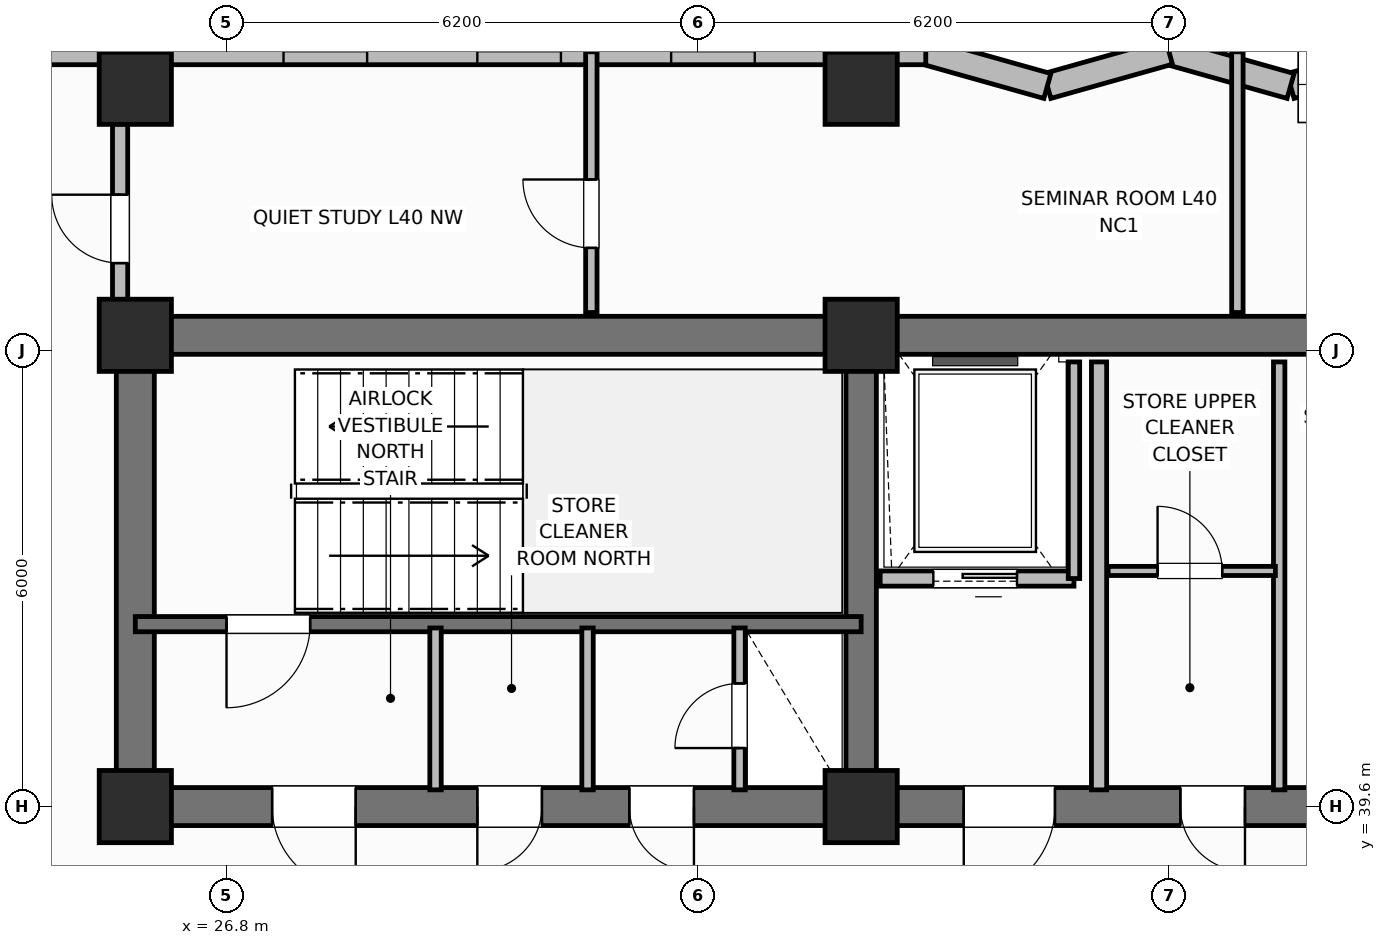
"""IFC4 building model, lengths in metres.
Left out: names, types, materials, properties, quantities, classifications, styles, units other than length and angle.
Written with IfcOpenShell. Run it as: python <this file> out.ifc"""

import sys

from ifc_helpers import new_model, si_unit, direction, frame, frame_2d, origin, origin_2d, place, context, subcontext, project, spatial, rectangle, extrude, element, fill, save


model = new_model("IFC4")
c1 = context("Model", 3, precision=1e-05, world=origin(), true_north=direction((0.0, 1.0)))
c2 = subcontext(c1, "Body", "Model", "MODEL_VIEW")
j1 = project(units=[si_unit("LENGTHUNIT", "METRE"), si_unit("PLANEANGLEUNIT", "RADIAN")], contexts=[c1])
p1 = place(None, origin())
s1 = spatial("IfcSite", under=j1, at=p1, CompositionType="ELEMENT")
p2 = place(p1, origin())
s2 = spatial("IfcBuilding", under=s1, at=p2, CompositionType="ELEMENT")
p3 = place(p2, frame((0.0, 0.0, 162.6)))
s3 = spatial("IfcBuildingStorey", under=s2, at=p3, CompositionType="ELEMENT", Elevation=162.6)
p4 = place(p3, frame((25.6, 45.8, 0.0), z_axis=(0.0, 0.0, 1.0), x_axis=(1.0, 0.0, 0.0)))
e1 = element("IfcWall", 1, at=p4, inside=s3, PredefinedType="SHEAR", context=c2, shape_type="SweptSolid", body=[
    extrude(rectangle(XDim=27.2, YDim=0.5, at=frame_2d((13.6, 0.0))), origin(), (0.0, 0.0, 1.0), 3.7),
])
p5 = place(p3, frame((25.6, 39.85, 0.0), z_axis=(0.0, 0.0, 1.0), x_axis=(0.0, 1.0, 0.0)))
e2 = element("IfcWall", 2, at=p5, inside=s3, PredefinedType="SHEAR", context=c2, shape_type="SweptSolid", body=[
    extrude(rectangle(XDim=5.7, YDim=0.5, at=frame_2d((2.85, 0.0))), origin(), (0.0, 0.0, 1.0), 3.7),
])
p6 = place(p3, frame((52.8, 39.6, 0.0), z_axis=(0.0, 0.0, 1.0), x_axis=(-1.0, 0.0, 0.0)))
e3 = element("IfcWall", 3, at=p6, inside=s3, PredefinedType="SHEAR", context=c2, shape_type="SweptSolid", body=[
    extrude(rectangle(XDim=27.2, YDim=0.5, at=frame_2d((13.6, 0.0))), origin(), (0.0, 0.0, 1.0), 3.7),
])
p7 = place(p6, frame((24.3, 0.0, 0.0)))
e4 = element("IfcOpeningElement", 4, at=p7, cuts=e3, PredefinedType="OPENING", context=c2, shape_type="SweptSolid", body=[
    extrude(rectangle(XDim=1.1, YDim=2.15, at=frame_2d((0.55, 1.075))), frame((0.0, 0.26, 0.0), z_axis=(0.0, -1.0, 0.0), x_axis=(1.0, 0.0, 0.0)), (0.0, 0.0, 1.0), 0.52),
])
p8 = place(p6, frame((21.85, 0.0, 0.0)))
e5 = element("IfcOpeningElement", 5, at=p8, cuts=e3, PredefinedType="OPENING", context=c2, shape_type="SweptSolid", body=[
    extrude(rectangle(XDim=0.85, YDim=2.1, at=frame_2d((0.425, 1.05))), frame((0.0, 0.26, 0.0), z_axis=(0.0, -1.0, 0.0), x_axis=(1.0, 0.0, 0.0)), (0.0, 0.0, 1.0), 0.52),
])
p9 = place(p6, frame((19.85, 0.0, 0.0)))
e6 = element("IfcOpeningElement", 6, at=p9, cuts=e3, PredefinedType="OPENING", context=c2, shape_type="SweptSolid", body=[
    extrude(rectangle(XDim=0.85, YDim=2.1, at=frame_2d((0.425, 1.05))), frame((0.0, 0.26, 0.0), z_axis=(0.0, -1.0, 0.0), x_axis=(1.0, 0.0, 0.0)), (0.0, 0.0, 1.0), 0.52),
])
p10 = place(p6, frame((15.1, 0.0, 0.0)))
e7 = element("IfcOpeningElement", 7, at=p10, cuts=e3, PredefinedType="OPENING", context=c2, shape_type="SweptSolid", body=[
    extrude(rectangle(XDim=1.2, YDim=2.15, at=frame_2d((0.6, 1.075))), frame((0.0, 0.26, 0.0), z_axis=(0.0, -1.0, 0.0), x_axis=(1.0, 0.0, 0.0)), (0.0, 0.0, 1.0), 0.52),
])
p11 = place(p6, frame((12.6, 0.0, 0.0)))
e8 = element("IfcOpeningElement", 8, at=p11, cuts=e3, PredefinedType="OPENING", context=c2, shape_type="SweptSolid", body=[
    extrude(rectangle(XDim=0.85, YDim=2.1, at=frame_2d((0.425, 1.05))), frame((0.0, 0.26, 0.0), z_axis=(0.0, -1.0, 0.0), x_axis=(1.0, 0.0, 0.0)), (0.0, 0.0, 1.0), 0.52),
])
p12 = place(p6, frame((10.85, 0.0, 0.0)))
e9 = element("IfcOpeningElement", 9, at=p12, cuts=e3, PredefinedType="OPENING", context=c2, shape_type="SweptSolid", body=[
    extrude(rectangle(XDim=0.85, YDim=2.1, at=frame_2d((0.425, 1.05))), frame((0.0, 0.26, 0.0), z_axis=(0.0, -1.0, 0.0), x_axis=(1.0, 0.0, 0.0)), (0.0, 0.0, 1.0), 0.52),
])
p13 = place(p6, frame((7.35, 0.0, 0.0)))
e10 = element("IfcOpeningElement", 10, at=p13, cuts=e3, PredefinedType="OPENING", context=c2, shape_type="SweptSolid", body=[
    extrude(rectangle(XDim=0.85, YDim=2.1, at=frame_2d((0.425, 1.05))), frame((0.0, 0.26, 0.0), z_axis=(0.0, -1.0, 0.0), x_axis=(1.0, 0.0, 0.0)), (0.0, 0.0, 1.0), 0.52),
])
p14 = place(p6, frame((5.35, 0.0, 0.0)))
e11 = element("IfcOpeningElement", 11, at=p14, cuts=e3, PredefinedType="OPENING", context=c2, shape_type="SweptSolid", body=[
    extrude(rectangle(XDim=0.85, YDim=2.1, at=frame_2d((0.425, 1.05))), frame((0.0, 0.26, 0.0), z_axis=(0.0, -1.0, 0.0), x_axis=(1.0, 0.0, 0.0)), (0.0, 0.0, 1.0), 0.52),
])
p15 = place(p6, frame((2.0, 0.0, 0.0)))
e12 = element("IfcOpeningElement", 12, at=p15, cuts=e3, PredefinedType="OPENING", context=c2, shape_type="SweptSolid", body=[
    extrude(rectangle(XDim=0.85, YDim=2.1, at=frame_2d((0.425, 1.05))), frame((0.0, 0.26, 0.0), z_axis=(0.0, -1.0, 0.0), x_axis=(1.0, 0.0, 0.0)), (0.0, 0.0, 1.0), 0.52),
])
p16 = place(p3, frame((35.15, 39.85, 0.0), z_axis=(0.0, 0.0, 1.0), x_axis=(0.0, 1.0, 0.0)))
e13 = element("IfcWall", 13, at=p16, inside=s3, PredefinedType="SHEAR", context=c2, shape_type="SweptSolid", body=[
    extrude(rectangle(XDim=5.7, YDim=0.4, at=frame_2d((2.85, 0.0))), origin(), (0.0, 0.0, 1.0), 3.7),
])
for number, where, z_axis, x_axis in (
    (14, (25.6, 39.6, 0.0), (0.0, 0.0, 1.0), (1.0, 0.0, 0.0)),
    (15, (25.6, 45.8, 0.0), (0.0, 0.0, 1.0), (1.0, 0.0, 0.0)),
    (16, (35.15, 39.6, 0.0), (0.0, 0.0, 1.0), (1.0, 0.0, 0.0)),
    (17, (35.15, 45.8, 0.0), (0.0, 0.0, 1.0), (1.0, 0.0, 0.0)),
    (18, (25.6, 49.05, 0.0), (0.0, 0.0, 1.0), (1.0, 0.0, 0.0)),
    (19, (35.15, 49.05, 0.0), (0.0, 0.0, 1.0), (1.0, 0.0, 0.0)),
):
    element("IfcColumn", number, at=place(p3, frame(where, z_axis=z_axis, x_axis=x_axis)), inside=s3, PredefinedType="COLUMN", context=c2, shape_type="SweptSolid", body=[
        extrude(rectangle(XDim=0.95, YDim=0.95, at=origin_2d()), origin(), (0.0, 0.0, 1.0), 3.7),
    ])
p17 = place(p3, frame((42.4, 49.53, 0.0), z_axis=(0.0, 0.0, 1.0), x_axis=(-0.962652136636, -0.270741322725, 0.0)))
e20 = element("IfcWall", 20, at=p17, inside=s3, PredefinedType="SOLIDWALL", context=c2, shape_type="SweptSolid", body=[
    extrude(rectangle(XDim=1.662, YDim=0.34, at=frame_2d((0.831, 0.0))), origin(), (0.0, 0.0, 1.0), 2.72),
])
p18 = place(p3, frame((40.8, 49.08, 0.0), z_axis=(0.0, 0.0, 1.0), x_axis=(-0.962662902433, 0.270703040766, 0.0)))
e21 = element("IfcWall", 21, at=p18, inside=s3, PredefinedType="SOLIDWALL", context=c2, shape_type="SweptSolid", body=[
    extrude(rectangle(XDim=1.662, YDim=0.34, at=frame_2d((0.831, 0.0))), origin(), (0.0, 0.0, 1.0), 2.72),
])
p19 = place(p3, frame((39.2, 49.53, 0.0), z_axis=(0.0, 0.0, 1.0), x_axis=(-0.962652136636, -0.270741322725, 0.0)))
e22 = element("IfcWall", 22, at=p19, inside=s3, PredefinedType="SOLIDWALL", context=c2, shape_type="SweptSolid", body=[
    extrude(rectangle(XDim=1.662, YDim=0.34, at=frame_2d((0.831, 0.0))), origin(), (0.0, 0.0, 1.0), 2.72),
])
p20 = place(p3, frame((37.6, 49.08, 0.0), z_axis=(0.0, 0.0, 1.0), x_axis=(-0.962662902433, 0.270703040766, 0.0)))
e23 = element("IfcWall", 23, at=p20, inside=s3, PredefinedType="SOLIDWALL", context=c2, shape_type="SweptSolid", body=[
    extrude(rectangle(XDim=1.662, YDim=0.34, at=frame_2d((0.831, 0.0))), origin(), (0.0, 0.0, 1.0), 2.72),
])
p21 = place(p3, frame((36.0, 49.53, 0.0), z_axis=(0.0, 0.0, 1.0), x_axis=(-1.0, 0.0, 0.0)))
e24 = element("IfcWall", 24, at=p21, inside=s3, PredefinedType="SOLIDWALL", context=c2, shape_type="SweptSolid", body=[
    extrude(rectangle(XDim=15.8, YDim=0.34, at=frame_2d((7.9, 0.0))), origin(), (0.0, 0.0, 1.0), 2.72),
])
p22 = place(p21, frame((2.25, 0.0, 0.95)))
e25 = element("IfcOpeningElement", 25, at=p22, cuts=e24, PredefinedType="OPENING", context=c2, shape_type="SweptSolid", body=[
    extrude(rectangle(XDim=1.1, YDim=1.65, at=frame_2d((0.55, 0.825))), frame((0.0, 0.18, 0.0), z_axis=(0.0, -1.0, 0.0), x_axis=(1.0, 0.0, 0.0)), (0.0, 0.0, 1.0), 0.36),
])
p23 = place(p21, frame((4.8, 0.0, 0.95)))
e26 = element("IfcOpeningElement", 26, at=p23, cuts=e24, PredefinedType="OPENING", context=c2, shape_type="SweptSolid", body=[
    extrude(rectangle(XDim=1.1, YDim=1.65, at=frame_2d((0.55, 0.825))), frame((0.0, 0.18, 0.0), z_axis=(0.0, -1.0, 0.0), x_axis=(1.0, 0.0, 0.0)), (0.0, 0.0, 1.0), 0.36),
])
p24 = place(p21, frame((7.35, 0.0, 0.95)))
e27 = element("IfcOpeningElement", 27, at=p24, cuts=e24, PredefinedType="OPENING", context=c2, shape_type="SweptSolid", body=[
    extrude(rectangle(XDim=1.1, YDim=1.65, at=frame_2d((0.55, 0.825))), frame((0.0, 0.18, 0.0), z_axis=(0.0, -1.0, 0.0), x_axis=(1.0, 0.0, 0.0)), (0.0, 0.0, 1.0), 0.36),
])
p25 = place(p21, frame((13.15, 0.0, 0.95)))
e28 = element("IfcOpeningElement", 28, at=p25, cuts=e24, PredefinedType="OPENING", context=c2, shape_type="SweptSolid", body=[
    extrude(rectangle(XDim=1.1, YDim=1.65, at=frame_2d((0.55, 0.825))), frame((0.0, 0.18, 0.0), z_axis=(0.0, -1.0, 0.0), x_axis=(1.0, 0.0, 0.0)), (0.0, 0.0, 1.0), 0.36),
])
p26 = place(p3, frame((35.15, 42.0, 0.0), z_axis=(0.0, 0.0, 1.0), x_axis=(-1.0, 0.0, 0.0)))
e29 = element("IfcWall", 29, at=p26, inside=s3, PredefinedType="SHEAR", context=c2, shape_type="SweptSolid", body=[
    extrude(rectangle(XDim=9.55, YDim=0.2, at=frame_2d((4.775, 0.0))), origin(), (0.0, 0.0, 1.0), 3.7),
])
p27 = place(p26, frame((7.25, 0.0, 0.0)))
e30 = element("IfcOpeningElement", 30, at=p27, cuts=e29, PredefinedType="OPENING", context=c2, shape_type="SweptSolid", body=[
    extrude(rectangle(XDim=1.1, YDim=2.15, at=frame_2d((0.55, 1.075))), frame((0.0, 0.11, 0.0), z_axis=(0.0, -1.0, 0.0), x_axis=(1.0, 0.0, 0.0)), (0.0, 0.0, 1.0), 0.22),
])
p28 = place(p3, frame((33.55, 39.82, 0.0), z_axis=(0.0, 0.0, 1.0), x_axis=(0.0, 1.0, 0.0)))
e31 = element("IfcWall", 31, at=p28, inside=s3, PredefinedType="PARTITIONING", context=c2, shape_type="SweptSolid", body=[
    extrude(rectangle(XDim=2.13, YDim=0.15, at=frame_2d((1.065, 0.0))), origin(), (0.0, 0.0, 1.0), 2.55),
])
p29 = place(p28, frame((0.55, 0.0, 0.0)))
e32 = element("IfcOpeningElement", 32, at=p29, cuts=e31, PredefinedType="OPENING", context=c2, shape_type="SweptSolid", body=[
    extrude(rectangle(XDim=0.85, YDim=2.05, at=frame_2d((0.425, 1.025))), frame((0.0, 0.085, 0.0), z_axis=(0.0, -1.0, 0.0), x_axis=(1.0, 0.0, 0.0)), (0.0, 0.0, 1.0), 0.17),
])
for number, where, z_axis, x_axis in (
    (33, (29.55, 39.82, 0.0), (0.0, 0.0, 1.0), (0.0, 1.0, 0.0)),
    (34, (31.55, 39.82, 0.0), (0.0, 0.0, 1.0), (0.0, 1.0, 0.0)),
):
    element("IfcWall", number, at=place(p3, frame(where, z_axis=z_axis, x_axis=x_axis)), inside=s3, PredefinedType="PARTITIONING", context=c2, shape_type="SweptSolid", body=[
        extrude(rectangle(XDim=2.13, YDim=0.15, at=frame_2d((1.065, 0.0))), origin(), (0.0, 0.0, 1.0), 2.55),
    ])
p30 = place(p3, frame((37.95, 42.6, 0.0), z_axis=(0.0, 0.0, 1.0), x_axis=(-1.0, 0.0, 0.0)))
e35 = element("IfcWall", 35, at=p30, inside=s3, PredefinedType="PARTITIONING", context=c2, shape_type="SweptSolid", body=[
    extrude(rectangle(XDim=2.55, YDim=0.2, at=frame_2d((1.275, 0.0))), origin(), (0.0, 0.0, 1.0), 2.32),
])
p31 = place(p30, frame((0.75, 0.0, 0.0)))
e36 = element("IfcOpeningElement", 36, at=p31, cuts=e35, PredefinedType="OPENING", context=c2, shape_type="SweptSolid", body=[
    extrude(rectangle(XDim=1.1, YDim=2.15, at=frame_2d((0.55, 1.075))), frame((0.0, 0.11, 0.0), z_axis=(0.0, -1.0, 0.0), x_axis=(1.0, 0.0, 0.0)), (0.0, 0.0, 1.0), 0.22),
])
p32 = place(p3, frame((37.95, 42.6, 0.0), z_axis=(0.0, 0.0, 1.0), x_axis=(0.0, 1.0, 0.0)))
e37 = element("IfcWall", 37, at=p32, inside=s3, PredefinedType="PARTITIONING", context=c2, shape_type="SweptSolid", body=[
    extrude(rectangle(XDim=2.85, YDim=0.15, at=frame_2d((1.425, 0.0))), origin(), (0.0, 0.0, 1.0), 2.55),
])
p33 = place(p3, frame((38.28, 39.82, 0.0), z_axis=(0.0, 0.0, 1.0), x_axis=(0.0, 1.0, 0.0)))
e38 = element("IfcWall", 38, at=p33, inside=s3, PredefinedType="PARTITIONING", context=c2, shape_type="SweptSolid", body=[
    extrude(rectangle(XDim=5.63, YDim=0.2, at=frame_2d((2.815, 0.0))), origin(), (0.0, 0.0, 1.0), 2.55),
])
p34 = place(p3, frame((40.65, 39.82, 0.0), z_axis=(0.0, 0.0, 1.0), x_axis=(0.0, 1.0, 0.0)))
e39 = element("IfcWall", 39, at=p34, inside=s3, PredefinedType="PARTITIONING", context=c2, shape_type="SweptSolid", body=[
    extrude(rectangle(XDim=5.63, YDim=0.15, at=frame_2d((2.815, 0.0))), origin(), (0.0, 0.0, 1.0), 2.55),
])
p35 = place(p3, frame((38.4, 42.7, 0.0), z_axis=(0.0, 0.0, 1.0), x_axis=(1.0, 0.0, 0.0)))
e40 = element("IfcWall", 40, at=p35, inside=s3, PredefinedType="PARTITIONING", context=c2, shape_type="SweptSolid", body=[
    extrude(rectangle(XDim=2.2, YDim=0.12, at=frame_2d((1.1, 0.0))), origin(), (0.0, 0.0, 1.0), 2.32),
])
p36 = place(p35, frame((0.65, 0.0, 0.0)))
e41 = element("IfcOpeningElement", 41, at=p36, cuts=e40, PredefinedType="OPENING", context=c2, shape_type="SweptSolid", body=[
    extrude(rectangle(XDim=0.85, YDim=2.1, at=frame_2d((0.425, 1.05))), frame((0.0, 0.07, 0.0), z_axis=(0.0, -1.0, 0.0), x_axis=(1.0, 0.0, 0.0)), (0.0, 0.0, 1.0), 0.14),
])
p37 = place(p3, frame((31.6, 46.1, 0.0), z_axis=(0.0, 0.0, 1.0), x_axis=(0.0, 1.0, 0.0)))
e42 = element("IfcWall", 42, at=p37, inside=s3, PredefinedType="PARTITIONING", context=c2, shape_type="SweptSolid", body=[
    extrude(rectangle(XDim=3.43, YDim=0.15, at=frame_2d((1.715, 0.0))), origin(), (0.0, 0.0, 1.0), 2.55),
])
p38 = place(p37, frame((0.85, 0.0, 0.0)))
e43 = element("IfcOpeningElement", 43, at=p38, cuts=e42, PredefinedType="OPENING", context=c2, shape_type="SweptSolid", body=[
    extrude(rectangle(XDim=0.9, YDim=2.1, at=frame_2d((0.45, 1.05))), frame((0.0, 0.085, 0.0), z_axis=(0.0, -1.0, 0.0), x_axis=(1.0, 0.0, 0.0)), (0.0, 0.0, 1.0), 0.17),
])
p39 = place(p3, frame((40.1, 46.1, 0.0), z_axis=(0.0, 0.0, 1.0), x_axis=(0.0, 1.0, 0.0)))
e44 = element("IfcWall", 44, at=p39, inside=s3, PredefinedType="PARTITIONING", context=c2, shape_type="SweptSolid", body=[
    extrude(rectangle(XDim=3.43, YDim=0.15, at=frame_2d((1.715, 0.0))), origin(), (0.0, 0.0, 1.0), 2.55),
])
p40 = place(p3, frame((25.4, 46.1, 0.0), z_axis=(0.0, 0.0, 1.0), x_axis=(0.0, 1.0, 0.0)))
e45 = element("IfcWall", 45, at=p40, inside=s3, PredefinedType="PARTITIONING", context=c2, shape_type="SweptSolid", body=[
    extrude(rectangle(XDim=2.48, YDim=0.2, at=frame_2d((1.24, 0.0))), origin(), (0.0, 0.0, 1.0), 2.55),
])
p41 = place(p40, frame((0.65, 0.0, 0.0)))
e46 = element("IfcOpeningElement", 46, at=p41, cuts=e45, PredefinedType="OPENING", context=c2, shape_type="SweptSolid", body=[
    extrude(rectangle(XDim=0.9, YDim=2.1, at=frame_2d((0.45, 1.05))), frame((0.0, 0.11, 0.0), z_axis=(0.0, -1.0, 0.0), x_axis=(1.0, 0.0, 0.0)), (0.0, 0.0, 1.0), 0.22),
])
p42 = place(p22, origin())
e47 = element("IfcWindow", 47, at=p42, inside=s3, PartitioningType="SINGLE_PANEL", PredefinedType="WINDOW", context=c2, shape_type="SweptSolid", body=[
    extrude(rectangle(XDim=1.1, YDim=1.65, at=frame_2d((0.55, 0.825))), frame((0.0, 0.03, 0.0), z_axis=(0.0, -1.0, 0.0), x_axis=(1.0, 0.0, 0.0)), (0.0, 0.0, 1.0), 0.06),
])
fill(e25, e47)
p43 = place(p23, origin())
e48 = element("IfcWindow", 48, at=p43, inside=s3, PartitioningType="SINGLE_PANEL", PredefinedType="WINDOW", context=c2, shape_type="SweptSolid", body=[
    extrude(rectangle(XDim=1.1, YDim=1.65, at=frame_2d((0.55, 0.825))), frame((0.0, 0.03, 0.0), z_axis=(0.0, -1.0, 0.0), x_axis=(1.0, 0.0, 0.0)), (0.0, 0.0, 1.0), 0.06),
])
fill(e26, e48)
p44 = place(p24, origin())
e49 = element("IfcWindow", 49, at=p44, inside=s3, PartitioningType="SINGLE_PANEL", PredefinedType="WINDOW", context=c2, shape_type="SweptSolid", body=[
    extrude(rectangle(XDim=1.1, YDim=1.65, at=frame_2d((0.55, 0.825))), frame((0.0, 0.03, 0.0), z_axis=(0.0, -1.0, 0.0), x_axis=(1.0, 0.0, 0.0)), (0.0, 0.0, 1.0), 0.06),
])
fill(e27, e49)
p45 = place(p27, origin())
e50 = element("IfcDoor", 50, at=p45, inside=s3, OperationType="SINGLE_SWING_RIGHT", PredefinedType="DOOR", context=c2, shape_type="SweptSolid", body=[
    extrude(rectangle(XDim=1.1, YDim=2.15, at=frame_2d((0.55, 1.075))), frame((0.0, 0.025, 0.0), z_axis=(0.0, -1.0, 0.0), x_axis=(1.0, 0.0, 0.0)), (0.0, 0.0, 1.0), 0.05),
])
fill(e30, e50)
p46 = place(p29, origin())
e51 = element("IfcDoor", 51, at=p46, inside=s3, OperationType="SINGLE_SWING_LEFT", PredefinedType="TRAPDOOR", context=c2, shape_type="SweptSolid", body=[
    extrude(rectangle(XDim=0.85, YDim=2.05, at=frame_2d((0.425, 1.025))), frame((0.0, 0.025, 0.0), z_axis=(0.0, -1.0, 0.0), x_axis=(1.0, 0.0, 0.0)), (0.0, 0.0, 1.0), 0.05),
])
fill(e32, e51)
p47 = place(p31, origin())
e52 = element("IfcDoor", 52, at=p47, inside=s3, OperationType="SLIDING_TO_LEFT", PredefinedType="DOOR", context=c2, shape_type="SweptSolid", body=[
    extrude(rectangle(XDim=1.1, YDim=2.15, at=frame_2d((0.55, 1.075))), frame((0.0, 0.025, 0.0), z_axis=(0.0, -1.0, 0.0), x_axis=(1.0, 0.0, 0.0)), (0.0, 0.0, 1.0), 0.05),
])
fill(e36, e52)
p48 = place(p36, origin())
e53 = element("IfcDoor", 53, at=p48, inside=s3, OperationType="SINGLE_SWING_LEFT", PredefinedType="DOOR", context=c2, shape_type="SweptSolid", body=[
    extrude(rectangle(XDim=0.85, YDim=2.1, at=frame_2d((0.425, 1.05))), frame((0.0, 0.025, 0.0), z_axis=(0.0, -1.0, 0.0), x_axis=(1.0, 0.0, 0.0)), (0.0, 0.0, 1.0), 0.05),
])
fill(e41, e53)
p49 = place(p38, origin())
e54 = element("IfcDoor", 54, at=p49, inside=s3, OperationType="SINGLE_SWING_RIGHT", PredefinedType="DOOR", context=c2, shape_type="SweptSolid", body=[
    extrude(rectangle(XDim=0.9, YDim=2.1, at=frame_2d((0.45, 1.05))), frame((0.0, 0.025, 0.0), z_axis=(0.0, -1.0, 0.0), x_axis=(1.0, 0.0, 0.0)), (0.0, 0.0, 1.0), 0.05),
])
fill(e43, e54)
p50 = place(p41, origin())
e55 = element("IfcDoor", 55, at=p50, inside=s3, OperationType="SINGLE_SWING_RIGHT", PredefinedType="DOOR", context=c2, shape_type="SweptSolid", body=[
    extrude(rectangle(XDim=0.9, YDim=2.1, at=frame_2d((0.45, 1.05))), frame((0.0, 0.025, 0.0), z_axis=(0.0, -1.0, 0.0), x_axis=(1.0, 0.0, 0.0)), (0.0, 0.0, 1.0), 0.05),
])
fill(e46, e55)
p51 = place(p7, origin())
e56 = element("IfcDoor", 56, at=p51, inside=s3, OperationType="SINGLE_SWING_LEFT", PredefinedType="DOOR", context=c2, shape_type="SweptSolid", body=[
    extrude(rectangle(XDim=1.1, YDim=2.15, at=frame_2d((0.55, 1.075))), frame((0.0, 0.025, 0.0), z_axis=(0.0, -1.0, 0.0), x_axis=(1.0, 0.0, 0.0)), (0.0, 0.0, 1.0), 0.05),
])
fill(e4, e56)
p52 = place(p8, origin())
e57 = element("IfcDoor", 57, at=p52, inside=s3, OperationType="SINGLE_SWING_RIGHT", PredefinedType="DOOR", context=c2, shape_type="SweptSolid", body=[
    extrude(rectangle(XDim=0.85, YDim=2.1, at=frame_2d((0.425, 1.05))), frame((0.0, 0.025, 0.0), z_axis=(0.0, -1.0, 0.0), x_axis=(1.0, 0.0, 0.0)), (0.0, 0.0, 1.0), 0.05),
])
fill(e5, e57)
p53 = place(p9, origin())
e58 = element("IfcDoor", 58, at=p53, inside=s3, OperationType="SINGLE_SWING_LEFT", PredefinedType="DOOR", context=c2, shape_type="SweptSolid", body=[
    extrude(rectangle(XDim=0.85, YDim=2.1, at=frame_2d((0.425, 1.05))), frame((0.0, 0.025, 0.0), z_axis=(0.0, -1.0, 0.0), x_axis=(1.0, 0.0, 0.0)), (0.0, 0.0, 1.0), 0.05),
])
fill(e6, e58)
p54 = place(p10, origin())
e59 = element("IfcDoor", 59, at=p54, inside=s3, OperationType="SINGLE_SWING_RIGHT", PredefinedType="DOOR", context=c2, shape_type="SweptSolid", body=[
    extrude(rectangle(XDim=1.2, YDim=2.15, at=frame_2d((0.6, 1.075))), frame((0.0, 0.025, 0.0), z_axis=(0.0, -1.0, 0.0), x_axis=(1.0, 0.0, 0.0)), (0.0, 0.0, 1.0), 0.05),
])
fill(e7, e59)
p55 = place(p11, origin())
e60 = element("IfcDoor", 60, at=p55, inside=s3, OperationType="SINGLE_SWING_LEFT", PredefinedType="DOOR", context=c2, shape_type="SweptSolid", body=[
    extrude(rectangle(XDim=0.85, YDim=2.1, at=frame_2d((0.425, 1.05))), frame((0.0, 0.025, 0.0), z_axis=(0.0, -1.0, 0.0), x_axis=(1.0, 0.0, 0.0)), (0.0, 0.0, 1.0), 0.05),
])
fill(e8, e60)
save(model, sys.argv[1])
